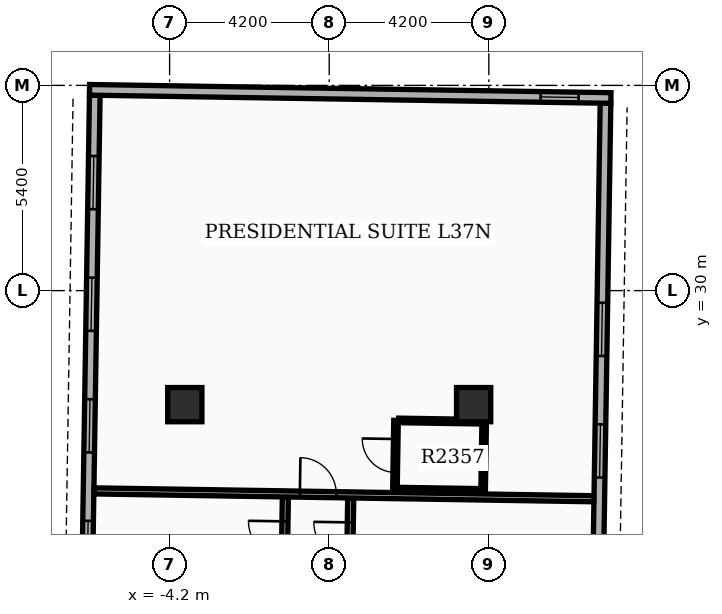
"""IFC4 building model, lengths in metres.
Left out: names, types, materials, properties, quantities, classifications, styles, units other than length and angle.
Written with IfcOpenShell. Run it as: python <this file> out.ifc"""

import sys

from ifc_helpers import new_model, si_unit, direction, frame, frame_2d, origin, origin_2d, place, context, subcontext, project, spatial, rectangle, extrude, element, fill, save


model = new_model("IFC4")
c1 = context("Model", 3, precision=1e-05, world=origin(), true_north=direction((0.0, 1.0)))
c2 = subcontext(c1, "Body", "Model", "MODEL_VIEW")
j1 = project(units=[si_unit("LENGTHUNIT", "METRE"), si_unit("PLANEANGLEUNIT", "RADIAN")], contexts=[c1])
p1 = place(None, origin())
s1 = spatial("IfcSite", under=j1, at=p1, CompositionType="ELEMENT")
p2 = place(p1, origin())
s2 = spatial("IfcBuilding", under=s1, at=p2, CompositionType="ELEMENT")
p3 = place(p2, frame((0.0, 0.0, 148.8)))
s3 = spatial("IfcBuildingStorey", under=s2, at=p3, CompositionType="ELEMENT", Elevation=148.8)
for number, where, z_axis, x_axis in (
    (1, (-3.8, 27.0, 0.0), (0.0, 0.0, 1.0), (1.0, 0.0, 0.0)),
    (2, (3.8, 27.0, 0.0), (0.0, 0.0, 1.0), (1.0, 0.0, 0.0)),
):
    element("IfcColumn", number, at=place(p3, frame(where, z_axis=z_axis, x_axis=x_axis)), inside=s3, PredefinedType="COLUMN", context=c2, shape_type="SweptSolid", body=[
        extrude(rectangle(XDim=0.9, YDim=0.9, at=origin_2d()), origin(), (0.0, 0.0, 1.0), 3.9),
    ])
p4 = place(p3, frame((6.954, 14.833, 0.0), z_axis=(0.0, 0.0, 1.0), x_axis=(0.015705059908, 0.999876667941, 0.0)))
e3 = element("IfcWall", 3, at=p4, inside=s3, PredefinedType="STANDARD", context=c2, shape_type="SweptSolid", body=[
    extrude(rectangle(XDim=20.1, YDim=0.28, at=frame_2d((10.05, 0.0))), origin(), (0.0, 0.0, 1.0), 2.97),
])
p5 = place(p4, frame((1.6, 0.0, 0.8)))
e4 = element("IfcOpeningElement", 4, at=p5, cuts=e3, PredefinedType="OPENING", context=c2, shape_type="SweptSolid", body=[
    extrude(rectangle(XDim=1.4, YDim=1.6, at=frame_2d((0.7, 0.8))), frame((0.0, 0.15, 0.0), z_axis=(0.0, -1.0, 0.0), x_axis=(1.0, 0.0, 0.0)), (0.0, 0.0, 1.0), 0.3),
])
p6 = place(p4, frame((6.55, 0.0, 0.8)))
e5 = element("IfcOpeningElement", 5, at=p6, cuts=e3, PredefinedType="OPENING", context=c2, shape_type="SweptSolid", body=[
    extrude(rectangle(XDim=1.4, YDim=1.6, at=frame_2d((0.7, 0.8))), frame((0.0, 0.15, 0.0), z_axis=(0.0, -1.0, 0.0), x_axis=(1.0, 0.0, 0.0)), (0.0, 0.0, 1.0), 0.3),
])
p7 = place(p4, frame((10.25, 0.0, 0.8)))
e6 = element("IfcOpeningElement", 6, at=p7, cuts=e3, PredefinedType="OPENING", context=c2, shape_type="SweptSolid", body=[
    extrude(rectangle(XDim=1.4, YDim=1.6, at=frame_2d((0.7, 0.8))), frame((0.0, 0.15, 0.0), z_axis=(0.0, -1.0, 0.0), x_axis=(1.0, 0.0, 0.0)), (0.0, 0.0, 1.0), 0.3),
])
p8 = place(p4, frame((13.45, 0.0, 0.8)))
e7 = element("IfcOpeningElement", 7, at=p8, cuts=e3, PredefinedType="OPENING", context=c2, shape_type="SweptSolid", body=[
    extrude(rectangle(XDim=1.4, YDim=1.6, at=frame_2d((0.7, 0.8))), frame((0.0, 0.15, 0.0), z_axis=(0.0, -1.0, 0.0), x_axis=(1.0, 0.0, 0.0)), (0.0, 0.0, 1.0), 0.3),
])
p9 = place(p3, frame((-6.169, 35.141, 0.0), z_axis=(0.0, 0.0, 1.0), x_axis=(-0.01571739401, -0.999876474133, 0.0)))
e8 = element("IfcWall", 8, at=p9, inside=s3, PredefinedType="STANDARD", context=c2, shape_type="SweptSolid", body=[
    extrude(rectangle(XDim=20.1, YDim=0.28, at=frame_2d((10.05, 0.0))), origin(), (0.0, 0.0, 1.0), 2.97),
])
p10 = place(p9, frame((1.6, 0.0, 0.8)))
e9 = element("IfcOpeningElement", 9, at=p10, cuts=e8, PredefinedType="OPENING", context=c2, shape_type="SweptSolid", body=[
    extrude(rectangle(XDim=1.4, YDim=1.6, at=frame_2d((0.7, 0.8))), frame((0.0, 0.15, 0.0), z_axis=(0.0, -1.0, 0.0), x_axis=(1.0, 0.0, 0.0)), (0.0, 0.0, 1.0), 0.3),
])
p11 = place(p9, frame((4.8, 0.0, 0.8)))
e10 = element("IfcOpeningElement", 10, at=p11, cuts=e8, PredefinedType="OPENING", context=c2, shape_type="SweptSolid", body=[
    extrude(rectangle(XDim=1.4, YDim=1.6, at=frame_2d((0.7, 0.8))), frame((0.0, 0.15, 0.0), z_axis=(0.0, -1.0, 0.0), x_axis=(1.0, 0.0, 0.0)), (0.0, 0.0, 1.0), 0.3),
])
p12 = place(p9, frame((8.0, 0.0, 0.8)))
e11 = element("IfcOpeningElement", 11, at=p12, cuts=e8, PredefinedType="OPENING", context=c2, shape_type="SweptSolid", body=[
    extrude(rectangle(XDim=1.4, YDim=1.6, at=frame_2d((0.7, 0.8))), frame((0.0, 0.15, 0.0), z_axis=(0.0, -1.0, 0.0), x_axis=(1.0, 0.0, 0.0)), (0.0, 0.0, 1.0), 0.3),
])
p13 = place(p9, frame((11.2, 0.0, 0.8)))
e12 = element("IfcOpeningElement", 12, at=p13, cuts=e8, PredefinedType="OPENING", context=c2, shape_type="SweptSolid", body=[
    extrude(rectangle(XDim=1.4, YDim=1.6, at=frame_2d((0.7, 0.8))), frame((0.0, 0.15, 0.0), z_axis=(0.0, -1.0, 0.0), x_axis=(1.0, 0.0, 0.0)), (0.0, 0.0, 1.0), 0.3),
])
p14 = place(p9, frame((15.0, 0.0, 0.0)))
e13 = element("IfcOpeningElement", 13, at=p14, cuts=e8, PredefinedType="OPENING", context=c2, shape_type="SweptSolid", body=[
    extrude(rectangle(XDim=0.96, YDim=2.1, at=frame_2d((0.48, 1.05))), frame((0.0, 0.15, 0.0), z_axis=(0.0, -1.0, 0.0), x_axis=(1.0, 0.0, 0.0)), (0.0, 0.0, 1.0), 0.3),
])
p15 = place(p3, frame((7.412, 35.068, 0.0), z_axis=(0.0, 0.0, 1.0), x_axis=(-0.999876549481, 0.015712599986, 0.0)))
e14 = element("IfcWall", 14, at=p15, inside=s3, PredefinedType="STANDARD", context=c2, shape_type="SweptSolid", body=[
    extrude(rectangle(XDim=13.72, YDim=0.28, at=frame_2d((6.86, 0.0))), origin(), (0.0, 0.0, 1.0), 2.97),
])
p16 = place(p15, frame((0.85, 0.0, 0.85)))
e15 = element("IfcOpeningElement", 15, at=p16, cuts=e14, PredefinedType="OPENING", context=c2, shape_type="SweptSolid", body=[
    extrude(rectangle(XDim=1.0, YDim=1.5, at=frame_2d((0.5, 0.75))), frame((0.0, 0.15, 0.0), z_axis=(0.0, -1.0, 0.0), x_axis=(1.0, 0.0, 0.0)), (0.0, 0.0, 1.0), 0.3),
])
p17 = place(p3, frame((0.413, 14.845, 0.0), z_axis=(0.0, 0.0, 1.0), x_axis=(0.015730426869, 0.999876269181, 0.0)))
e16 = element("IfcWall", 16, at=p17, inside=s3, PredefinedType="PARTITIONING", context=c2, shape_type="SweptSolid", body=[
    extrude(rectangle(XDim=9.7, YDim=0.16, at=frame_2d((4.85, 0.0))), origin(), (0.0, 0.0, 1.0), 2.96),
])
p18 = place(p17, frame((2.575, 0.0, 0.0)))
e17 = element("IfcOpeningElement", 17, at=p18, cuts=e16, PredefinedType="OPENING", context=c2, shape_type="SweptSolid", body=[
    extrude(rectangle(XDim=0.96, YDim=2.15, at=frame_2d((0.48, 1.075))), frame((0.0, 0.09, 0.0), z_axis=(0.0, -1.0, 0.0), x_axis=(1.0, 0.0, 0.0)), (0.0, 0.0, 1.0), 0.18),
])
p19 = place(p17, frame((8.097, 0.0, 0.0)))
e18 = element("IfcOpeningElement", 18, at=p19, cuts=e16, PredefinedType="OPENING", context=c2, shape_type="SweptSolid", body=[
    extrude(rectangle(XDim=0.96, YDim=2.15, at=frame_2d((0.48, 1.075))), frame((0.0, 0.09, 0.0), z_axis=(0.0, -1.0, 0.0), x_axis=(1.0, 0.0, 0.0)), (0.0, 0.0, 1.0), 0.18),
])
p20 = place(p3, frame((-1.307, 14.872, 0.0), z_axis=(0.0, 0.0, 1.0), x_axis=(0.015705264399, 0.999876664729, 0.0)))
e19 = element("IfcWall", 19, at=p20, inside=s3, PredefinedType="PARTITIONING", context=c2, shape_type="SweptSolid", body=[
    extrude(rectangle(XDim=9.7, YDim=0.16, at=frame_2d((4.85, 0.0))), origin(), (0.0, 0.0, 1.0), 2.96),
])
p21 = place(p20, frame((2.575, 0.0, 0.0)))
e20 = element("IfcOpeningElement", 20, at=p21, cuts=e19, PredefinedType="OPENING", context=c2, shape_type="SweptSolid", body=[
    extrude(rectangle(XDim=0.96, YDim=2.15, at=frame_2d((0.48, 1.075))), frame((0.0, 0.09, 0.0), z_axis=(0.0, -1.0, 0.0), x_axis=(1.0, 0.0, 0.0)), (0.0, 0.0, 1.0), 0.18),
])
p22 = place(p20, frame((8.097, 0.0, 0.0)))
e21 = element("IfcOpeningElement", 21, at=p22, cuts=e19, PredefinedType="OPENING", context=c2, shape_type="SweptSolid", body=[
    extrude(rectangle(XDim=0.96, YDim=2.15, at=frame_2d((0.48, 1.075))), frame((0.0, 0.09, 0.0), z_axis=(0.0, -1.0, 0.0), x_axis=(1.0, 0.0, 0.0)), (0.0, 0.0, 1.0), 0.18),
])
p23 = place(p3, frame((-6.184, 24.73, 0.0), z_axis=(0.0, 0.0, 1.0), x_axis=(0.999876528878, -0.015713911007, 0.0)))
e22 = element("IfcWall", 22, at=p23, inside=s3, PredefinedType="PARTITIONING", context=c2, shape_type="SweptSolid", body=[
    extrude(rectangle(XDim=13.144, YDim=0.16, at=frame_2d((6.572, 0.0))), origin(), (0.0, 0.0, 1.0), 2.96),
])
p24 = place(p23, frame((5.412, 0.0, 0.0)))
e23 = element("IfcOpeningElement", 23, at=p24, cuts=e22, PredefinedType="OPENING", context=c2, shape_type="SweptSolid", body=[
    extrude(rectangle(XDim=0.96, YDim=2.15, at=frame_2d((0.48, 1.075))), frame((0.0, 0.09, 0.0), z_axis=(0.0, -1.0, 0.0), x_axis=(1.0, 0.0, 0.0)), (0.0, 0.0, 1.0), 0.18),
])
p25 = place(p3, frame((1.729, 24.766, 0.0), z_axis=(0.0, 0.0, 1.0), x_axis=(0.015694337248, 0.999876836305, 0.0)))
e24 = element("IfcWall", 24, at=p25, inside=s3, PredefinedType="PARTITIONING", context=c2, shape_type="SweptSolid", body=[
    extrude(rectangle(XDim=1.82, YDim=0.12, at=frame_2d((0.91, 0.0))), origin(), (0.0, 0.0, 1.0), 2.96),
])
p26 = place(p25, frame((0.45, 0.0, 0.0)))
e25 = element("IfcOpeningElement", 25, at=p26, cuts=e24, PredefinedType="OPENING", context=c2, shape_type="SweptSolid", body=[
    extrude(rectangle(XDim=0.88, YDim=2.1, at=frame_2d((0.44, 1.05))), frame((0.0, 0.07, 0.0), z_axis=(0.0, -1.0, 0.0), x_axis=(1.0, 0.0, 0.0)), (0.0, 0.0, 1.0), 0.14),
])
p27 = place(p3, frame((4.049, 24.729, 0.0), z_axis=(0.0, 0.0, 1.0), x_axis=(0.015694337248, 0.999876836305, 0.0)))
e26 = element("IfcWall", 26, at=p27, inside=s3, PredefinedType="PARTITIONING", context=c2, shape_type="SweptSolid", body=[
    extrude(rectangle(XDim=1.82, YDim=0.12, at=frame_2d((0.91, 0.0))), origin(), (0.0, 0.0, 1.0), 2.96),
])
for number, where, z_axis, x_axis in (
    (27, (1.799, 24.765, 0.0), (0.0, 0.0, 1.0), (1.0, -0.016, 0.0)),
    (28, (1.828, 26.585, 0.0), (0.0, 0.0, 1.0), (1.0, -0.016, 0.0)),
):
    element("IfcWall", number, at=place(p3, frame(where, z_axis=z_axis, x_axis=x_axis)), inside=s3, PredefinedType="PARTITIONING", context=c2, shape_type="SweptSolid", body=[
        extrude(rectangle(XDim=2.18, YDim=0.12, at=frame_2d((1.09, 0.0))), origin(), (0.0, 0.0, 1.0), 2.96),
    ])
p28 = place(p7, origin())
e29 = element("IfcWindow", 29, at=p28, inside=s3, PartitioningType="SINGLE_PANEL", PredefinedType="WINDOW", context=c2, shape_type="SweptSolid", body=[
    extrude(rectangle(XDim=1.4, YDim=1.6, at=frame_2d((0.7, 0.8))), frame((0.0, 0.03, 0.0), z_axis=(0.0, -1.0, 0.0), x_axis=(1.0, 0.0, 0.0)), (0.0, 0.0, 1.0), 0.06),
])
fill(e6, e29)
p29 = place(p8, origin())
e30 = element("IfcWindow", 30, at=p29, inside=s3, PartitioningType="SINGLE_PANEL", PredefinedType="WINDOW", context=c2, shape_type="SweptSolid", body=[
    extrude(rectangle(XDim=1.4, YDim=1.6, at=frame_2d((0.7, 0.8))), frame((0.0, 0.03, 0.0), z_axis=(0.0, -1.0, 0.0), x_axis=(1.0, 0.0, 0.0)), (0.0, 0.0, 1.0), 0.06),
])
fill(e7, e30)
p30 = place(p10, origin())
e31 = element("IfcWindow", 31, at=p30, inside=s3, PartitioningType="SINGLE_PANEL", PredefinedType="WINDOW", context=c2, shape_type="SweptSolid", body=[
    extrude(rectangle(XDim=1.4, YDim=1.6, at=frame_2d((0.7, 0.8))), frame((0.0, 0.03, 0.0), z_axis=(0.0, -1.0, 0.0), x_axis=(1.0, 0.0, 0.0)), (0.0, 0.0, 1.0), 0.06),
])
fill(e9, e31)
p31 = place(p11, origin())
e32 = element("IfcWindow", 32, at=p31, inside=s3, PartitioningType="SINGLE_PANEL", PredefinedType="WINDOW", context=c2, shape_type="SweptSolid", body=[
    extrude(rectangle(XDim=1.4, YDim=1.6, at=frame_2d((0.7, 0.8))), frame((0.0, 0.03, 0.0), z_axis=(0.0, -1.0, 0.0), x_axis=(1.0, 0.0, 0.0)), (0.0, 0.0, 1.0), 0.06),
])
fill(e10, e32)
p32 = place(p12, origin())
e33 = element("IfcWindow", 33, at=p32, inside=s3, PartitioningType="SINGLE_PANEL", PredefinedType="WINDOW", context=c2, shape_type="SweptSolid", body=[
    extrude(rectangle(XDim=1.4, YDim=1.6, at=frame_2d((0.7, 0.8))), frame((0.0, 0.03, 0.0), z_axis=(0.0, -1.0, 0.0), x_axis=(1.0, 0.0, 0.0)), (0.0, 0.0, 1.0), 0.06),
])
fill(e11, e33)
p33 = place(p13, origin())
e34 = element("IfcWindow", 34, at=p33, inside=s3, PartitioningType="SINGLE_PANEL", PredefinedType="WINDOW", context=c2, shape_type="SweptSolid", body=[
    extrude(rectangle(XDim=1.4, YDim=1.6, at=frame_2d((0.7, 0.8))), frame((0.0, 0.03, 0.0), z_axis=(0.0, -1.0, 0.0), x_axis=(1.0, 0.0, 0.0)), (0.0, 0.0, 1.0), 0.06),
])
fill(e12, e34)
p34 = place(p16, origin())
e35 = element("IfcWindow", 35, at=p34, inside=s3, PartitioningType="SINGLE_PANEL", PredefinedType="WINDOW", context=c2, shape_type="SweptSolid", body=[
    extrude(rectangle(XDim=1.0, YDim=1.5, at=frame_2d((0.5, 0.75))), frame((0.0, 0.03, 0.0), z_axis=(0.0, -1.0, 0.0), x_axis=(1.0, 0.0, 0.0)), (0.0, 0.0, 1.0), 0.06),
])
fill(e15, e35)
p35 = place(p19, origin())
e36 = element("IfcDoor", 36, at=p35, inside=s3, OperationType="SINGLE_SWING_RIGHT", PredefinedType="DOOR", context=c2, shape_type="SweptSolid", body=[
    extrude(rectangle(XDim=0.96, YDim=2.15, at=frame_2d((0.48, 1.075))), frame((0.0, 0.025, 0.0), z_axis=(0.0, -1.0, 0.0), x_axis=(1.0, 0.0, 0.0)), (0.0, 0.0, 1.0), 0.05),
])
fill(e18, e36)
p36 = place(p22, origin())
e37 = element("IfcDoor", 37, at=p36, inside=s3, OperationType="SINGLE_SWING_RIGHT", PredefinedType="DOOR", context=c2, shape_type="SweptSolid", body=[
    extrude(rectangle(XDim=0.96, YDim=2.15, at=frame_2d((0.48, 1.075))), frame((0.0, 0.025, 0.0), z_axis=(0.0, -1.0, 0.0), x_axis=(1.0, 0.0, 0.0)), (0.0, 0.0, 1.0), 0.05),
])
fill(e21, e37)
p37 = place(p24, origin())
e38 = element("IfcDoor", 38, at=p37, inside=s3, OperationType="SINGLE_SWING_LEFT", PredefinedType="DOOR", context=c2, shape_type="SweptSolid", body=[
    extrude(rectangle(XDim=0.96, YDim=2.15, at=frame_2d((0.48, 1.075))), frame((0.0, 0.025, 0.0), z_axis=(0.0, -1.0, 0.0), x_axis=(1.0, 0.0, 0.0)), (0.0, 0.0, 1.0), 0.05),
])
fill(e23, e38)
p38 = place(p26, origin())
e39 = element("IfcDoor", 39, at=p38, inside=s3, OperationType="SINGLE_SWING_RIGHT", PredefinedType="DOOR", context=c2, shape_type="SweptSolid", body=[
    extrude(rectangle(XDim=0.88, YDim=2.1, at=frame_2d((0.44, 1.05))), frame((0.0, 0.025, 0.0), z_axis=(0.0, -1.0, 0.0), x_axis=(1.0, 0.0, 0.0)), (0.0, 0.0, 1.0), 0.05),
])
fill(e25, e39)
save(model, sys.argv[1])
